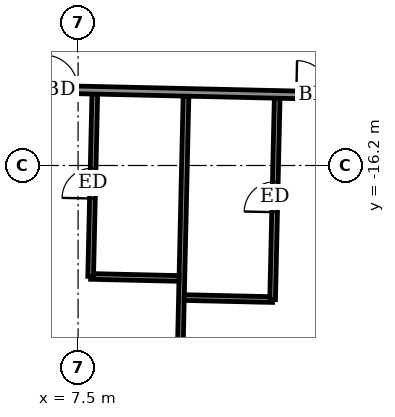
"""IFC4 building model, lengths in metres.
Left out: names, types, materials, properties, quantities, classifications, styles, units other than length and angle.
Written with IfcOpenShell. Run it as: python <this file> out.ifc"""

import sys

from ifc_helpers import new_model, si_unit, direction, frame, frame_2d, origin, place, context, subcontext, project, spatial, rectangle, extrude, element, fill, save


model = new_model("IFC4")
c1 = context("Model", 3, precision=1e-05, world=origin(), true_north=direction((0.0, 1.0)))
c2 = subcontext(c1, "Body", "Model", "MODEL_VIEW")
j1 = project(units=[si_unit("LENGTHUNIT", "METRE"), si_unit("PLANEANGLEUNIT", "RADIAN")], contexts=[c1])
p1 = place(None, origin())
s1 = spatial("IfcSite", under=j1, at=p1, CompositionType="ELEMENT")
p2 = place(p1, origin())
s2 = spatial("IfcBuilding", under=s1, at=p2, CompositionType="ELEMENT")
p3 = place(p2, frame((0.0, 0.0, 309.7)))
s3 = spatial("IfcBuildingStorey", under=s2, at=p3, CompositionType="ELEMENT", Elevation=309.7)
p4 = place(p3, frame((10.08, -25.822, 0.0), z_axis=(0.0, 0.0, 1.0), x_axis=(0.022708327922, 0.999742132674, 0.0)))
e1 = element("IfcWall", 1, at=p4, inside=s3, PredefinedType="PARTITIONING", context=c2, shape_type="SweptSolid", body=[
    extrude(rectangle(XDim=11.45, YDim=0.15, at=frame_2d((5.725, 0.0))), origin(), (0.0, 0.0, 1.0), 2.5),
])
p5 = place(p3, frame((10.294, -19.675, 0.0), z_axis=(0.0, 0.0, 1.0), x_axis=(0.999740478815, -0.022781023197, 0.0)))
e2 = element("IfcWall", 2, at=p5, inside=s3, PredefinedType="PARTITIONING", context=c2, shape_type="SweptSolid", body=[
    extrude(rectangle(XDim=2.325, YDim=0.15, at=frame_2d((1.163, 0.0))), origin(), (0.0, 0.0, 1.0), 3.05),
])
p6 = place(p3, frame((12.619, -19.728, 0.0), z_axis=(0.0, 0.0, 1.0), x_axis=(0.022661766832, 0.999743189186, 0.0)))
e3 = element("IfcWall", 3, at=p6, inside=s3, PredefinedType="PARTITIONING", context=c2, shape_type="SweptSolid", body=[
    extrude(rectangle(XDim=5.301, YDim=0.15, at=frame_2d((2.65, 0.0))), origin(), (0.0, 0.0, 1.0), 3.05),
])
p7 = place(p6, frame((2.3, 0.0, 0.0)))
e4 = element("IfcOpeningElement", 4, at=p7, cuts=e3, PredefinedType="OPENING", context=c2, shape_type="SweptSolid", body=[
    extrude(rectangle(XDim=0.8, YDim=2.1, at=frame_2d((0.4, 1.05))), frame((0.0, 0.085, 0.0), z_axis=(0.0, -1.0, 0.0), x_axis=(1.0, 0.0, 0.0)), (0.0, 0.0, 1.0), 0.17),
])
p8 = place(p3, frame((7.831, -19.119, 0.0), z_axis=(0.0, 0.0, 1.0), x_axis=(0.999738082346, -0.022885950011, 0.0)))
e5 = element("IfcWall", 5, at=p8, inside=s3, PredefinedType="PARTITIONING", context=c2, shape_type="SweptSolid", body=[
    extrude(rectangle(XDim=2.325, YDim=0.15, at=frame_2d((1.163, 0.0))), origin(), (0.0, 0.0, 1.0), 3.05),
])
p9 = place(p3, frame((7.831, -19.119, 0.0), z_axis=(0.0, 0.0, 1.0), x_axis=(0.022689048768, 0.999742570398, 0.0)))
e6 = element("IfcWall", 6, at=p9, inside=s3, PredefinedType="PARTITIONING", context=c2, shape_type="SweptSolid", body=[
    extrude(rectangle(XDim=4.799, YDim=0.15, at=frame_2d((2.399, 0.0))), origin(), (0.0, 0.0, 1.0), 3.05),
])
p10 = place(p9, frame((2.05, 0.0, 0.0)))
e7 = element("IfcOpeningElement", 7, at=p10, cuts=e6, PredefinedType="OPENING", context=c2, shape_type="SweptSolid", body=[
    extrude(rectangle(XDim=0.8, YDim=2.1, at=frame_2d((0.4, 1.05))), frame((0.0, 0.085, 0.0), z_axis=(0.0, -1.0, 0.0), x_axis=(1.0, 0.0, 0.0)), (0.0, 0.0, 1.0), 0.17),
])
p11 = place(p3, frame((-31.347, -13.329, 0.0), z_axis=(0.0, 0.0, 1.0), x_axis=(0.999742613079, -0.022687168058, 0.0)))
e8 = element("IfcWall", 8, at=p11, inside=s3, PredefinedType="PARTITIONING", context=c2, shape_type="SweptSolid", body=[
    extrude(rectangle(XDim=58.799, YDim=0.2, at=frame_2d((29.399, 0.0))), origin(), (0.0, 0.0, 1.0), 3.05),
])
p12 = place(p11, frame((1.35, 0.0, 0.0)))
e9 = element("IfcOpeningElement", 9, at=p12, cuts=e8, PredefinedType="OPENING", context=c2, shape_type="SweptSolid", body=[
    extrude(rectangle(XDim=1.0, YDim=2.1, at=frame_2d((0.5, 1.05))), frame((0.0, 0.11, 0.0), z_axis=(0.0, -1.0, 0.0), x_axis=(1.0, 0.0, 0.0)), (0.0, 0.0, 1.0), 0.22),
])
p13 = place(p11, frame((5.95, 0.0, 0.0)))
e10 = element("IfcOpeningElement", 10, at=p13, cuts=e8, PredefinedType="OPENING", context=c2, shape_type="SweptSolid", body=[
    extrude(rectangle(XDim=0.9, YDim=2.1, at=frame_2d((0.45, 1.05))), frame((0.0, 0.11, 0.0), z_axis=(0.0, -1.0, 0.0), x_axis=(1.0, 0.0, 0.0)), (0.0, 0.0, 1.0), 0.22),
])
p14 = place(p11, frame((10.575, 0.0, 0.0)))
e11 = element("IfcOpeningElement", 11, at=p14, cuts=e8, PredefinedType="OPENING", context=c2, shape_type="SweptSolid", body=[
    extrude(rectangle(XDim=0.9, YDim=2.1, at=frame_2d((0.45, 1.05))), frame((0.0, 0.11, 0.0), z_axis=(0.0, -1.0, 0.0), x_axis=(1.0, 0.0, 0.0)), (0.0, 0.0, 1.0), 0.22),
])
p15 = place(p11, frame((12.425, 0.0, 0.0)))
e12 = element("IfcOpeningElement", 12, at=p15, cuts=e8, PredefinedType="OPENING", context=c2, shape_type="SweptSolid", body=[
    extrude(rectangle(XDim=0.9, YDim=2.1, at=frame_2d((0.45, 1.05))), frame((0.0, 0.11, 0.0), z_axis=(0.0, -1.0, 0.0), x_axis=(1.0, 0.0, 0.0)), (0.0, 0.0, 1.0), 0.22),
])
p16 = place(p11, frame((19.075, 0.0, 0.0)))
e13 = element("IfcOpeningElement", 13, at=p16, cuts=e8, PredefinedType="OPENING", context=c2, shape_type="SweptSolid", body=[
    extrude(rectangle(XDim=0.9, YDim=2.1, at=frame_2d((0.45, 1.05))), frame((0.0, 0.11, 0.0), z_axis=(0.0, -1.0, 0.0), x_axis=(1.0, 0.0, 0.0)), (0.0, 0.0, 1.0), 0.22),
])
p17 = place(p11, frame((20.95, 0.0, 0.0)))
e14 = element("IfcOpeningElement", 14, at=p17, cuts=e8, PredefinedType="OPENING", context=c2, shape_type="SweptSolid", body=[
    extrude(rectangle(XDim=0.9, YDim=2.1, at=frame_2d((0.45, 1.05))), frame((0.0, 0.11, 0.0), z_axis=(0.0, -1.0, 0.0), x_axis=(1.0, 0.0, 0.0)), (0.0, 0.0, 1.0), 0.22),
])
p18 = place(p11, frame((27.625, 0.0, 0.0)))
e15 = element("IfcOpeningElement", 15, at=p18, cuts=e8, PredefinedType="OPENING", context=c2, shape_type="SweptSolid", body=[
    extrude(rectangle(XDim=0.9, YDim=2.1, at=frame_2d((0.45, 1.05))), frame((0.0, 0.11, 0.0), z_axis=(0.0, -1.0, 0.0), x_axis=(1.0, 0.0, 0.0)), (0.0, 0.0, 1.0), 0.22),
])
p19 = place(p11, frame((29.475, 0.0, 0.0)))
e16 = element("IfcOpeningElement", 16, at=p19, cuts=e8, PredefinedType="OPENING", context=c2, shape_type="SweptSolid", body=[
    extrude(rectangle(XDim=0.9, YDim=2.1, at=frame_2d((0.45, 1.05))), frame((0.0, 0.11, 0.0), z_axis=(0.0, -1.0, 0.0), x_axis=(1.0, 0.0, 0.0)), (0.0, 0.0, 1.0), 0.22),
])
p20 = place(p11, frame((36.125, 0.0, 0.0)))
e17 = element("IfcOpeningElement", 17, at=p20, cuts=e8, PredefinedType="OPENING", context=c2, shape_type="SweptSolid", body=[
    extrude(rectangle(XDim=0.9, YDim=2.1, at=frame_2d((0.45, 1.05))), frame((0.0, 0.11, 0.0), z_axis=(0.0, -1.0, 0.0), x_axis=(1.0, 0.0, 0.0)), (0.0, 0.0, 1.0), 0.22),
])
p21 = place(p11, frame((37.95, 0.0, 0.0)))
e18 = element("IfcOpeningElement", 18, at=p21, cuts=e8, PredefinedType="OPENING", context=c2, shape_type="SweptSolid", body=[
    extrude(rectangle(XDim=0.9, YDim=2.1, at=frame_2d((0.45, 1.05))), frame((0.0, 0.11, 0.0), z_axis=(0.0, -1.0, 0.0), x_axis=(1.0, 0.0, 0.0)), (0.0, 0.0, 1.0), 0.22),
])
p22 = place(p11, frame((44.6, 0.0, 0.0)))
e19 = element("IfcOpeningElement", 19, at=p22, cuts=e8, PredefinedType="OPENING", context=c2, shape_type="SweptSolid", body=[
    extrude(rectangle(XDim=0.9, YDim=2.1, at=frame_2d((0.45, 1.05))), frame((0.0, 0.11, 0.0), z_axis=(0.0, -1.0, 0.0), x_axis=(1.0, 0.0, 0.0)), (0.0, 0.0, 1.0), 0.22),
])
p23 = place(p11, frame((46.475, 0.0, 0.0)))
e20 = element("IfcOpeningElement", 20, at=p23, cuts=e8, PredefinedType="OPENING", context=c2, shape_type="SweptSolid", body=[
    extrude(rectangle(XDim=0.9, YDim=2.1, at=frame_2d((0.45, 1.05))), frame((0.0, 0.11, 0.0), z_axis=(0.0, -1.0, 0.0), x_axis=(1.0, 0.0, 0.0)), (0.0, 0.0, 1.0), 0.22),
])
p24 = place(p11, frame((55.925, 0.0, 0.0)))
e21 = element("IfcOpeningElement", 21, at=p24, cuts=e8, PredefinedType="OPENING", context=c2, shape_type="SweptSolid", body=[
    extrude(rectangle(XDim=1.0, YDim=2.1, at=frame_2d((0.5, 1.05))), frame((0.0, 0.11, 0.0), z_axis=(0.0, -1.0, 0.0), x_axis=(1.0, 0.0, 0.0)), (0.0, 0.0, 1.0), 0.22),
])
p25 = place(p11, frame((51.0, 0.0, 0.0)))
e22 = element("IfcOpeningElement", 22, at=p25, cuts=e8, PredefinedType="OPENING", context=c2, shape_type="SweptSolid", body=[
    extrude(rectangle(XDim=0.9, YDim=2.1, at=frame_2d((0.45, 1.05))), frame((0.0, 0.11, 0.0), z_axis=(0.0, -1.0, 0.0), x_axis=(1.0, 0.0, 0.0)), (0.0, 0.0, 1.0), 0.22),
])
p26 = place(p21, origin())
e23 = element("IfcDoor", 23, at=p26, inside=s3, OperationType="SINGLE_SWING_RIGHT", PredefinedType="DOOR", context=c2, shape_type="SweptSolid", body=[
    extrude(rectangle(XDim=0.9, YDim=2.1, at=frame_2d((0.45, 1.05))), frame((0.0, 0.025, 0.0), z_axis=(0.0, -1.0, 0.0), x_axis=(1.0, 0.0, 0.0)), (0.0, 0.0, 1.0), 0.05),
])
fill(e18, e23)
p27 = place(p10, origin())
e24 = element("IfcDoor", 24, at=p27, inside=s3, OperationType="SINGLE_SWING_RIGHT", PredefinedType="DOOR", context=c2, shape_type="SweptSolid", body=[
    extrude(rectangle(XDim=0.8, YDim=2.1, at=frame_2d((0.4, 1.05))), frame((0.0, 0.025, 0.0), z_axis=(0.0, -1.0, 0.0), x_axis=(1.0, 0.0, 0.0)), (0.0, 0.0, 1.0), 0.05),
])
fill(e7, e24)
p28 = place(p22, origin())
e25 = element("IfcDoor", 25, at=p28, inside=s3, OperationType="SINGLE_SWING_LEFT", PredefinedType="DOOR", context=c2, shape_type="SweptSolid", body=[
    extrude(rectangle(XDim=0.9, YDim=2.1, at=frame_2d((0.45, 1.05))), frame((0.0, 0.025, 0.0), z_axis=(0.0, -1.0, 0.0), x_axis=(1.0, 0.0, 0.0)), (0.0, 0.0, 1.0), 0.05),
])
fill(e19, e25)
p29 = place(p7, origin())
e26 = element("IfcDoor", 26, at=p29, inside=s3, OperationType="SINGLE_SWING_LEFT", PredefinedType="DOOR", context=c2, shape_type="SweptSolid", body=[
    extrude(rectangle(XDim=0.8, YDim=2.1, at=frame_2d((0.4, 1.05))), frame((0.0, 0.025, 0.0), z_axis=(0.0, -1.0, 0.0), x_axis=(1.0, 0.0, 0.0)), (0.0, 0.0, 1.0), 0.05),
])
fill(e4, e26)
save(model, sys.argv[1])
